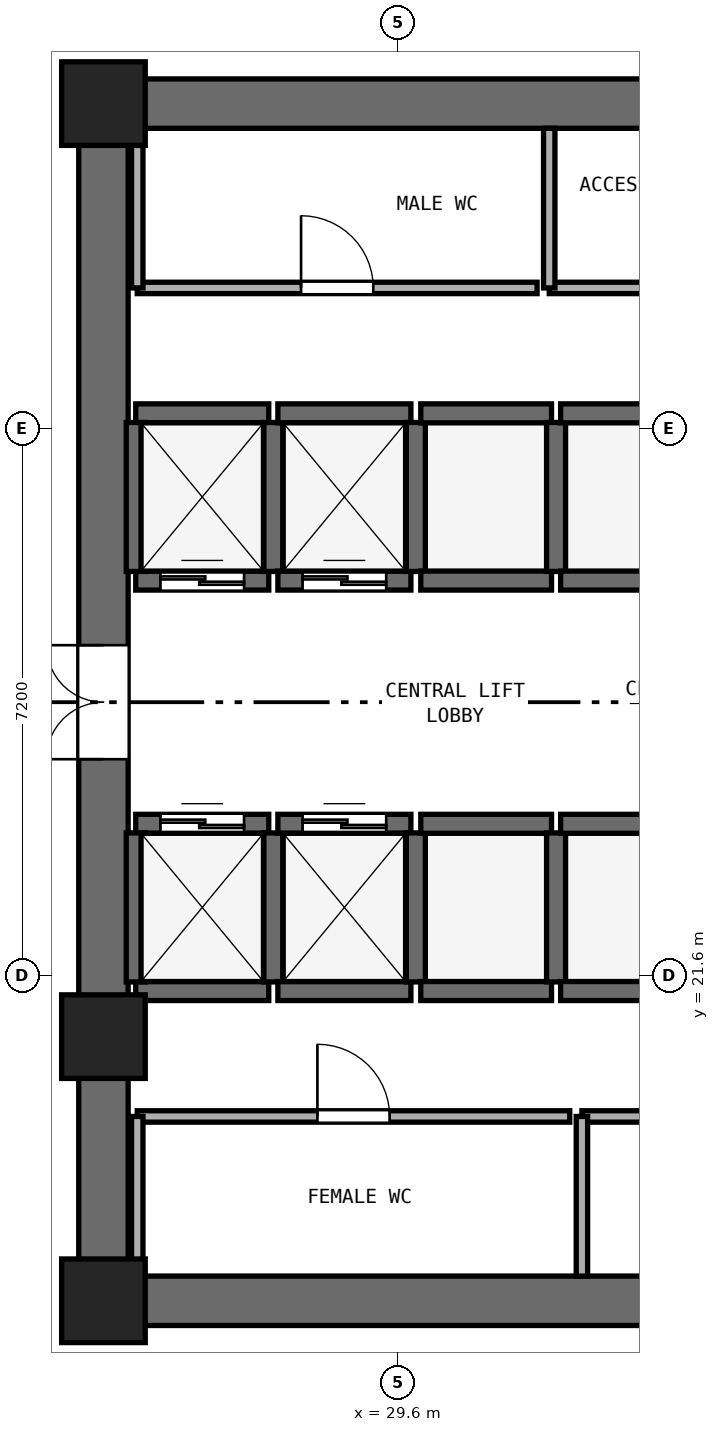
"""IFC4 building model, lengths in metres.
Left out: names, types, materials, properties, quantities, classifications, styles, units other than length and angle.
Written with IfcOpenShell. Run it as: python <this file> out.ifc"""

import sys

from ifc_helpers import new_model, si_unit, direction, frame, frame_2d, origin, origin_2d, place, context, subcontext, project, spatial, rectangle, extrude, element, fill, save


model = new_model("IFC4")
c1 = context("Model", 3, precision=1e-05, world=origin(), true_north=direction((0.0, 1.0)))
c2 = subcontext(c1, "Body", "Model", "MODEL_VIEW")
j1 = project(units=[si_unit("LENGTHUNIT", "METRE"), si_unit("PLANEANGLEUNIT", "RADIAN")], contexts=[c1])
p1 = place(None, origin())
s1 = spatial("IfcSite", under=j1, at=p1, CompositionType="ELEMENT")
p2 = place(p1, origin())
s2 = spatial("IfcBuilding", under=s1, at=p2, CompositionType="ELEMENT")
p3 = place(p2, frame((0.0, 0.0, 108.6)))
s3 = spatial("IfcBuildingStorey", under=s2, at=p3, CompositionType="ELEMENT", Elevation=108.6)
for number, where, z_axis, x_axis in (
    (1, (25.4, 17.325, 0.0), (0.0, 0.0, 1.0), (1.0, 0.0, 0.0)),
    (2, (25.4, 33.075, 0.0), (0.0, 0.0, 1.0), (1.0, 0.0, 0.0)),
):
    element("IfcWall", number, at=place(p3, frame(where, z_axis=z_axis, x_axis=x_axis)), inside=s3, PredefinedType="SHEAR", context=c2, shape_type="SweptSolid", body=[
        extrude(rectangle(XDim=23.2, YDim=0.65, at=frame_2d((11.6, 0.0))), origin(), (0.0, 0.0, 1.0), 3.525),
    ])
p4 = place(p3, frame((25.725, 17.65, 0.0), z_axis=(0.0, 0.0, 1.0), x_axis=(0.0, 1.0, 0.0)))
e3 = element("IfcWall", 3, at=p4, inside=s3, PredefinedType="SHEAR", context=c2, shape_type="SweptSolid", body=[
    extrude(rectangle(XDim=15.1, YDim=0.65, at=frame_2d((7.55, 0.0))), origin(), (0.0, 0.0, 1.0), 3.525),
])
p5 = place(p4, frame((6.8, 0.0, 0.0)))
e4 = element("IfcOpeningElement", 4, at=p5, cuts=e3, PredefinedType="OPENING", context=c2, shape_type="SweptSolid", body=[
    extrude(rectangle(XDim=1.5, YDim=2.15, at=frame_2d((0.75, 1.075))), frame((0.0, 0.335, 0.0), z_axis=(0.0, -1.0, 0.0), x_axis=(1.0, 0.0, 0.0)), (0.0, 0.0, 1.0), 0.67),
])
for number, where, z_axis, x_axis in (
    (5, (25.725, 17.325, 0.0), (0.0, 0.0, 1.0), (1.0, 0.0, 0.0)),
    (6, (25.725, 33.075, 0.0), (0.0, 0.0, 1.0), (1.0, 0.0, 0.0)),
    (7, (25.725, 20.8, 0.0), (0.0, 0.0, 1.0), (1.0, 0.0, 0.0)),
):
    element("IfcColumn", number, at=place(p3, frame(where, z_axis=z_axis, x_axis=x_axis)), inside=s3, PredefinedType="PILASTER", context=c2, shape_type="SweptSolid", body=[
        extrude(rectangle(XDim=1.1, YDim=1.1, at=origin_2d()), origin(), (0.0, 0.0, 1.0), 3.8),
    ])
p6 = place(p3, frame((26.15, 26.8, 0.0), z_axis=(0.0, 0.0, 1.0), x_axis=(1.0, 0.0, 0.0)))
e8 = element("IfcWall", 8, at=p6, inside=s3, PredefinedType="SHEAR", context=c2, shape_type="SweptSolid", body=[
    extrude(rectangle(XDim=1.75, YDim=0.25, at=frame_2d((0.875, 0.0))), origin(), (0.0, 0.0, 1.0), 3.525),
])
p7 = place(p6, frame((0.325, 0.0, 0.0)))
e9 = element("IfcOpeningElement", 9, at=p7, cuts=e8, PredefinedType="OPENING", context=c2, shape_type="SweptSolid", body=[
    extrude(rectangle(XDim=1.1, YDim=2.15, at=frame_2d((0.55, 1.075))), frame((0.0, 0.135, 0.0), z_axis=(0.0, -1.0, 0.0), x_axis=(1.0, 0.0, 0.0)), (0.0, 0.0, 1.0), 0.27),
])
p8 = place(p3, frame((26.15, 29.0, 0.0), z_axis=(0.0, 0.0, 1.0), x_axis=(1.0, 0.0, 0.0)))
e10 = element("IfcWall", 10, at=p8, inside=s3, PredefinedType="SHEAR", context=c2, shape_type="SweptSolid", body=[
    extrude(rectangle(XDim=1.75, YDim=0.25, at=frame_2d((0.875, 0.0))), origin(), (0.0, 0.0, 1.0), 3.525),
])
for number, where, z_axis, x_axis in (
    (11, (26.15, 26.92, 0.0), (0.0, 0.0, 1.0), (0.0, 1.0, 0.0)),
    (12, (27.96, 26.92, 0.0), (0.0, 0.0, 1.0), (0.0, 1.0, 0.0)),
):
    element("IfcWall", number, at=place(p3, frame(where, z_axis=z_axis, x_axis=x_axis)), inside=s3, PredefinedType="SHEAR", context=c2, shape_type="SweptSolid", body=[
        extrude(rectangle(XDim=1.96, YDim=0.25, at=frame_2d((0.98, 0.0))), origin(), (0.0, 0.0, 1.0), 3.525),
    ])
p9 = place(p3, frame((28.02, 26.8, 0.0), z_axis=(0.0, 0.0, 1.0), x_axis=(1.0, 0.0, 0.0)))
e13 = element("IfcWall", 13, at=p9, inside=s3, PredefinedType="SHEAR", context=c2, shape_type="SweptSolid", body=[
    extrude(rectangle(XDim=1.75, YDim=0.25, at=frame_2d((0.875, 0.0))), origin(), (0.0, 0.0, 1.0), 3.525),
])
p10 = place(p9, frame((0.325, 0.0, 0.0)))
e14 = element("IfcOpeningElement", 14, at=p10, cuts=e13, PredefinedType="OPENING", context=c2, shape_type="SweptSolid", body=[
    extrude(rectangle(XDim=1.1, YDim=2.15, at=frame_2d((0.55, 1.075))), frame((0.0, 0.135, 0.0), z_axis=(0.0, -1.0, 0.0), x_axis=(1.0, 0.0, 0.0)), (0.0, 0.0, 1.0), 0.27),
])
p11 = place(p3, frame((28.02, 29.0, 0.0), z_axis=(0.0, 0.0, 1.0), x_axis=(1.0, 0.0, 0.0)))
e15 = element("IfcWall", 15, at=p11, inside=s3, PredefinedType="SHEAR", context=c2, shape_type="SweptSolid", body=[
    extrude(rectangle(XDim=1.75, YDim=0.25, at=frame_2d((0.875, 0.0))), origin(), (0.0, 0.0, 1.0), 3.525),
])
p12 = place(p3, frame((29.835, 26.92, 0.0), z_axis=(0.0, 0.0, 1.0), x_axis=(0.0, 1.0, 0.0)))
e16 = element("IfcWall", 16, at=p12, inside=s3, PredefinedType="SHEAR", context=c2, shape_type="SweptSolid", body=[
    extrude(rectangle(XDim=1.96, YDim=0.25, at=frame_2d((0.98, 0.0))), origin(), (0.0, 0.0, 1.0), 3.525),
])
p13 = place(p3, frame((26.15, 21.4, 0.0), z_axis=(0.0, 0.0, 1.0), x_axis=(1.0, 0.0, 0.0)))
e17 = element("IfcWall", 17, at=p13, inside=s3, PredefinedType="SHEAR", context=c2, shape_type="SweptSolid", body=[
    extrude(rectangle(XDim=1.75, YDim=0.25, at=frame_2d((0.875, 0.0))), origin(), (0.0, 0.0, 1.0), 3.525),
])
p14 = place(p3, frame((26.15, 23.6, 0.0), z_axis=(0.0, 0.0, 1.0), x_axis=(1.0, 0.0, 0.0)))
e18 = element("IfcWall", 18, at=p14, inside=s3, PredefinedType="SHEAR", context=c2, shape_type="SweptSolid", body=[
    extrude(rectangle(XDim=1.75, YDim=0.25, at=frame_2d((0.875, 0.0))), origin(), (0.0, 0.0, 1.0), 3.525),
])
p15 = place(p14, frame((0.325, 0.0, 0.0)))
e19 = element("IfcOpeningElement", 19, at=p15, cuts=e18, PredefinedType="OPENING", context=c2, shape_type="SweptSolid", body=[
    extrude(rectangle(XDim=1.1, YDim=2.15, at=frame_2d((0.55, 1.075))), frame((0.0, 0.135, 0.0), z_axis=(0.0, -1.0, 0.0), x_axis=(1.0, 0.0, 0.0)), (0.0, 0.0, 1.0), 0.27),
])
for number, where, z_axis, x_axis in (
    (20, (26.15, 21.52, 0.0), (0.0, 0.0, 1.0), (0.0, 1.0, 0.0)),
    (21, (27.96, 21.52, 0.0), (0.0, 0.0, 1.0), (0.0, 1.0, 0.0)),
):
    element("IfcWall", number, at=place(p3, frame(where, z_axis=z_axis, x_axis=x_axis)), inside=s3, PredefinedType="SHEAR", context=c2, shape_type="SweptSolid", body=[
        extrude(rectangle(XDim=1.96, YDim=0.25, at=frame_2d((0.98, 0.0))), origin(), (0.0, 0.0, 1.0), 3.525),
    ])
p16 = place(p3, frame((28.02, 21.4, 0.0), z_axis=(0.0, 0.0, 1.0), x_axis=(1.0, 0.0, 0.0)))
e22 = element("IfcWall", 22, at=p16, inside=s3, PredefinedType="SHEAR", context=c2, shape_type="SweptSolid", body=[
    extrude(rectangle(XDim=1.75, YDim=0.25, at=frame_2d((0.875, 0.0))), origin(), (0.0, 0.0, 1.0), 3.525),
])
p17 = place(p3, frame((28.02, 23.6, 0.0), z_axis=(0.0, 0.0, 1.0), x_axis=(1.0, 0.0, 0.0)))
e23 = element("IfcWall", 23, at=p17, inside=s3, PredefinedType="SHEAR", context=c2, shape_type="SweptSolid", body=[
    extrude(rectangle(XDim=1.75, YDim=0.25, at=frame_2d((0.875, 0.0))), origin(), (0.0, 0.0, 1.0), 3.525),
])
p18 = place(p17, frame((0.325, 0.0, 0.0)))
e24 = element("IfcOpeningElement", 24, at=p18, cuts=e23, PredefinedType="OPENING", context=c2, shape_type="SweptSolid", body=[
    extrude(rectangle(XDim=1.1, YDim=2.15, at=frame_2d((0.55, 1.075))), frame((0.0, 0.135, 0.0), z_axis=(0.0, -1.0, 0.0), x_axis=(1.0, 0.0, 0.0)), (0.0, 0.0, 1.0), 0.27),
])
p19 = place(p3, frame((29.835, 21.52, 0.0), z_axis=(0.0, 0.0, 1.0), x_axis=(0.0, 1.0, 0.0)))
e25 = element("IfcWall", 25, at=p19, inside=s3, PredefinedType="SHEAR", context=c2, shape_type="SweptSolid", body=[
    extrude(rectangle(XDim=1.96, YDim=0.25, at=frame_2d((0.98, 0.0))), origin(), (0.0, 0.0, 1.0), 3.525),
])
for number, where, z_axis, x_axis in (
    (26, (29.9, 21.4, 0.0), (0.0, 0.0, 1.0), (1.0, 0.0, 0.0)),
    (27, (29.9, 23.6, 0.0), (0.0, 0.0, 1.0), (1.0, 0.0, 0.0)),
):
    element("IfcWall", number, at=place(p3, frame(where, z_axis=z_axis, x_axis=x_axis)), inside=s3, PredefinedType="SHEAR", context=c2, shape_type="SweptSolid", body=[
        extrude(rectangle(XDim=1.72, YDim=0.25, at=frame_2d((0.86, 0.0))), origin(), (0.0, 0.0, 1.0), 3.525),
    ])
p20 = place(p3, frame((31.68, 21.52, 0.0), z_axis=(0.0, 0.0, 1.0), x_axis=(0.0, 1.0, 0.0)))
e28 = element("IfcWall", 28, at=p20, inside=s3, PredefinedType="SHEAR", context=c2, shape_type="SweptSolid", body=[
    extrude(rectangle(XDim=1.96, YDim=0.25, at=frame_2d((0.98, 0.0))), origin(), (0.0, 0.0, 1.0), 3.525),
])
for number, where, z_axis, x_axis in (
    (29, (31.74, 21.4, 0.0), (0.0, 0.0, 1.0), (1.0, 0.0, 0.0)),
    (30, (31.74, 23.6, 0.0), (0.0, 0.0, 1.0), (1.0, 0.0, 0.0)),
):
    element("IfcWall", number, at=place(p3, frame(where, z_axis=z_axis, x_axis=x_axis)), inside=s3, PredefinedType="SHEAR", context=c2, shape_type="SweptSolid", body=[
        extrude(rectangle(XDim=1.72, YDim=0.25, at=frame_2d((0.86, 0.0))), origin(), (0.0, 0.0, 1.0), 3.525),
    ])
for number, where, z_axis, x_axis in (
    (31, (29.9, 26.8, 0.0), (0.0, 0.0, 1.0), (1.0, 0.0, 0.0)),
    (32, (29.9, 29.0, 0.0), (0.0, 0.0, 1.0), (1.0, 0.0, 0.0)),
):
    element("IfcWall", number, at=place(p3, frame(where, z_axis=z_axis, x_axis=x_axis)), inside=s3, PredefinedType="SHEAR", context=c2, shape_type="SweptSolid", body=[
        extrude(rectangle(XDim=1.72, YDim=0.25, at=frame_2d((0.86, 0.0))), origin(), (0.0, 0.0, 1.0), 3.525),
    ])
p21 = place(p3, frame((31.68, 26.92, 0.0), z_axis=(0.0, 0.0, 1.0), x_axis=(0.0, 1.0, 0.0)))
e33 = element("IfcWall", 33, at=p21, inside=s3, PredefinedType="SHEAR", context=c2, shape_type="SweptSolid", body=[
    extrude(rectangle(XDim=1.96, YDim=0.25, at=frame_2d((0.98, 0.0))), origin(), (0.0, 0.0, 1.0), 3.525),
])
for number, where, z_axis, x_axis in (
    (34, (31.74, 26.8, 0.0), (0.0, 0.0, 1.0), (1.0, 0.0, 0.0)),
    (35, (31.74, 29.0, 0.0), (0.0, 0.0, 1.0), (1.0, 0.0, 0.0)),
):
    element("IfcWall", number, at=place(p3, frame(where, z_axis=z_axis, x_axis=x_axis)), inside=s3, PredefinedType="SHEAR", context=c2, shape_type="SweptSolid", body=[
        extrude(rectangle(XDim=1.72, YDim=0.25, at=frame_2d((0.86, 0.0))), origin(), (0.0, 0.0, 1.0), 3.525),
    ])
p22 = place(p3, frame((26.17, 30.65, 0.0), z_axis=(0.0, 0.0, 1.0), x_axis=(1.0, 0.0, 0.0)))
e36 = element("IfcWall", 36, at=p22, inside=s3, PredefinedType="PARTITIONING", context=c2, shape_type="SweptSolid", body=[
    extrude(rectangle(XDim=5.26, YDim=0.15, at=frame_2d((2.63, 0.0))), origin(), (0.0, 0.0, 1.0), 3.525),
])
p23 = place(p22, frame((2.155, 0.0, 0.0)))
e37 = element("IfcOpeningElement", 37, at=p23, cuts=e36, PredefinedType="OPENING", context=c2, shape_type="SweptSolid", body=[
    extrude(rectangle(XDim=0.95, YDim=2.1, at=frame_2d((0.475, 1.05))), frame((0.0, 0.085, 0.0), z_axis=(0.0, -1.0, 0.0), x_axis=(1.0, 0.0, 0.0)), (0.0, 0.0, 1.0), 0.17),
])
p24 = place(p3, frame((26.17, 30.65, 0.0), z_axis=(0.0, 0.0, 1.0), x_axis=(0.0, 1.0, 0.0)))
e38 = element("IfcWall", 38, at=p24, inside=s3, PredefinedType="PARTITIONING", context=c2, shape_type="SweptSolid", body=[
    extrude(rectangle(XDim=2.1, YDim=0.15, at=frame_2d((1.05, 0.0))), origin(), (0.0, 0.0, 1.0), 3.525),
])
p25 = place(p3, frame((31.59, 30.65, 0.0), z_axis=(0.0, 0.0, 1.0), x_axis=(1.0, 0.0, 0.0)))
e39 = element("IfcWall", 39, at=p25, inside=s3, PredefinedType="PARTITIONING", context=c2, shape_type="SweptSolid", body=[
    extrude(rectangle(XDim=5.26, YDim=0.15, at=frame_2d((2.63, 0.0))), origin(), (0.0, 0.0, 1.0), 3.525),
])
p26 = place(p25, frame((2.155, 0.0, 0.0)))
e40 = element("IfcOpeningElement", 40, at=p26, cuts=e39, PredefinedType="OPENING", context=c2, shape_type="SweptSolid", body=[
    extrude(rectangle(XDim=0.95, YDim=2.1, at=frame_2d((0.475, 1.05))), frame((0.0, 0.085, 0.0), z_axis=(0.0, -1.0, 0.0), x_axis=(1.0, 0.0, 0.0)), (0.0, 0.0, 1.0), 0.17),
])
p27 = place(p3, frame((31.59, 30.65, 0.0), z_axis=(0.0, 0.0, 1.0), x_axis=(0.0, 1.0, 0.0)))
e41 = element("IfcWall", 41, at=p27, inside=s3, PredefinedType="PARTITIONING", context=c2, shape_type="SweptSolid", body=[
    extrude(rectangle(XDim=2.1, YDim=0.15, at=frame_2d((1.05, 0.0))), origin(), (0.0, 0.0, 1.0), 3.525),
])
p28 = place(p3, frame((26.17, 19.75, 0.0), z_axis=(0.0, 0.0, 1.0), x_axis=(1.0, 0.0, 0.0)))
e42 = element("IfcWall", 42, at=p28, inside=s3, PredefinedType="PARTITIONING", context=c2, shape_type="SweptSolid", body=[
    extrude(rectangle(XDim=5.69, YDim=0.15, at=frame_2d((2.845, 0.0))), origin(), (0.0, 0.0, 1.0), 3.525),
])
p29 = place(p28, frame((2.37, 0.0, 0.0)))
e43 = element("IfcOpeningElement", 43, at=p29, cuts=e42, PredefinedType="OPENING", context=c2, shape_type="SweptSolid", body=[
    extrude(rectangle(XDim=0.95, YDim=2.1, at=frame_2d((0.475, 1.05))), frame((0.0, 0.085, 0.0), z_axis=(0.0, -1.0, 0.0), x_axis=(1.0, 0.0, 0.0)), (0.0, 0.0, 1.0), 0.17),
])
p30 = place(p3, frame((26.17, 17.65, 0.0), z_axis=(0.0, 0.0, 1.0), x_axis=(0.0, 1.0, 0.0)))
e44 = element("IfcWall", 44, at=p30, inside=s3, PredefinedType="PARTITIONING", context=c2, shape_type="SweptSolid", body=[
    extrude(rectangle(XDim=2.1, YDim=0.15, at=frame_2d((1.05, 0.0))), origin(), (0.0, 0.0, 1.0), 3.525),
])
p31 = place(p3, frame((32.02, 19.75, 0.0), z_axis=(0.0, 0.0, 1.0), x_axis=(1.0, 0.0, 0.0)))
e45 = element("IfcWall", 45, at=p31, inside=s3, PredefinedType="PARTITIONING", context=c2, shape_type="SweptSolid", body=[
    extrude(rectangle(XDim=4.83, YDim=0.15, at=frame_2d((2.415, 0.0))), origin(), (0.0, 0.0, 1.0), 3.525),
])
p32 = place(p31, frame((1.965, 0.0, 0.0)))
e46 = element("IfcOpeningElement", 46, at=p32, cuts=e45, PredefinedType="OPENING", context=c2, shape_type="SweptSolid", body=[
    extrude(rectangle(XDim=0.9, YDim=2.1, at=frame_2d((0.45, 1.05))), frame((0.0, 0.085, 0.0), z_axis=(0.0, -1.0, 0.0), x_axis=(1.0, 0.0, 0.0)), (0.0, 0.0, 1.0), 0.17),
])
p33 = place(p3, frame((32.02, 17.65, 0.0), z_axis=(0.0, 0.0, 1.0), x_axis=(0.0, 1.0, 0.0)))
e47 = element("IfcWall", 47, at=p33, inside=s3, PredefinedType="PARTITIONING", context=c2, shape_type="SweptSolid", body=[
    extrude(rectangle(XDim=2.1, YDim=0.15, at=frame_2d((1.05, 0.0))), origin(), (0.0, 0.0, 1.0), 3.525),
])
p34 = place(p7, origin())
e48 = element("IfcDoor", 48, at=p34, inside=s3, OperationType="DOUBLE_DOOR_SLIDING", PredefinedType="DOOR", context=c2, shape_type="SweptSolid", body=[
    extrude(rectangle(XDim=1.1, YDim=2.15, at=frame_2d((0.55, 1.075))), frame((0.0, 0.025, 0.0), z_axis=(0.0, -1.0, 0.0), x_axis=(1.0, 0.0, 0.0)), (0.0, 0.0, 1.0), 0.05),
])
fill(e9, e48)
p35 = place(p10, origin())
e49 = element("IfcDoor", 49, at=p35, inside=s3, OperationType="DOUBLE_DOOR_SLIDING", PredefinedType="DOOR", context=c2, shape_type="SweptSolid", body=[
    extrude(rectangle(XDim=1.1, YDim=2.15, at=frame_2d((0.55, 1.075))), frame((0.0, 0.025, 0.0), z_axis=(0.0, -1.0, 0.0), x_axis=(1.0, 0.0, 0.0)), (0.0, 0.0, 1.0), 0.05),
])
fill(e14, e49)
p36 = place(p15, origin())
e50 = element("IfcDoor", 50, at=p36, inside=s3, OperationType="DOUBLE_DOOR_SLIDING", PredefinedType="DOOR", context=c2, shape_type="SweptSolid", body=[
    extrude(rectangle(XDim=1.1, YDim=2.15, at=frame_2d((0.55, 1.075))), frame((0.0, 0.025, 0.0), z_axis=(0.0, -1.0, 0.0), x_axis=(1.0, 0.0, 0.0)), (0.0, 0.0, 1.0), 0.05),
])
fill(e19, e50)
p37 = place(p18, origin())
e51 = element("IfcDoor", 51, at=p37, inside=s3, OperationType="DOUBLE_DOOR_SLIDING", PredefinedType="DOOR", context=c2, shape_type="SweptSolid", body=[
    extrude(rectangle(XDim=1.1, YDim=2.15, at=frame_2d((0.55, 1.075))), frame((0.0, 0.025, 0.0), z_axis=(0.0, -1.0, 0.0), x_axis=(1.0, 0.0, 0.0)), (0.0, 0.0, 1.0), 0.05),
])
fill(e24, e51)
p38 = place(p5, origin())
e52 = element("IfcDoor", 52, at=p38, inside=s3, OperationType="DOUBLE_DOOR_SINGLE_SWING", PredefinedType="DOOR", context=c2, shape_type="SweptSolid", body=[
    extrude(rectangle(XDim=1.5, YDim=2.15, at=frame_2d((0.75, 1.075))), frame((0.0, 0.025, 0.0), z_axis=(0.0, -1.0, 0.0), x_axis=(1.0, 0.0, 0.0)), (0.0, 0.0, 1.0), 0.05),
])
fill(e4, e52)
p39 = place(p23, origin())
e53 = element("IfcDoor", 53, at=p39, inside=s3, OperationType="SINGLE_SWING_LEFT", PredefinedType="DOOR", context=c2, shape_type="SweptSolid", body=[
    extrude(rectangle(XDim=0.95, YDim=2.1, at=frame_2d((0.475, 1.05))), frame((0.0, 0.025, 0.0), z_axis=(0.0, -1.0, 0.0), x_axis=(1.0, 0.0, 0.0)), (0.0, 0.0, 1.0), 0.05),
])
fill(e37, e53)
p40 = place(p29, origin())
e54 = element("IfcDoor", 54, at=p40, inside=s3, OperationType="SINGLE_SWING_LEFT", PredefinedType="DOOR", context=c2, shape_type="SweptSolid", body=[
    extrude(rectangle(XDim=0.95, YDim=2.1, at=frame_2d((0.475, 1.05))), frame((0.0, 0.025, 0.0), z_axis=(0.0, -1.0, 0.0), x_axis=(1.0, 0.0, 0.0)), (0.0, 0.0, 1.0), 0.05),
])
fill(e43, e54)
save(model, sys.argv[1])
